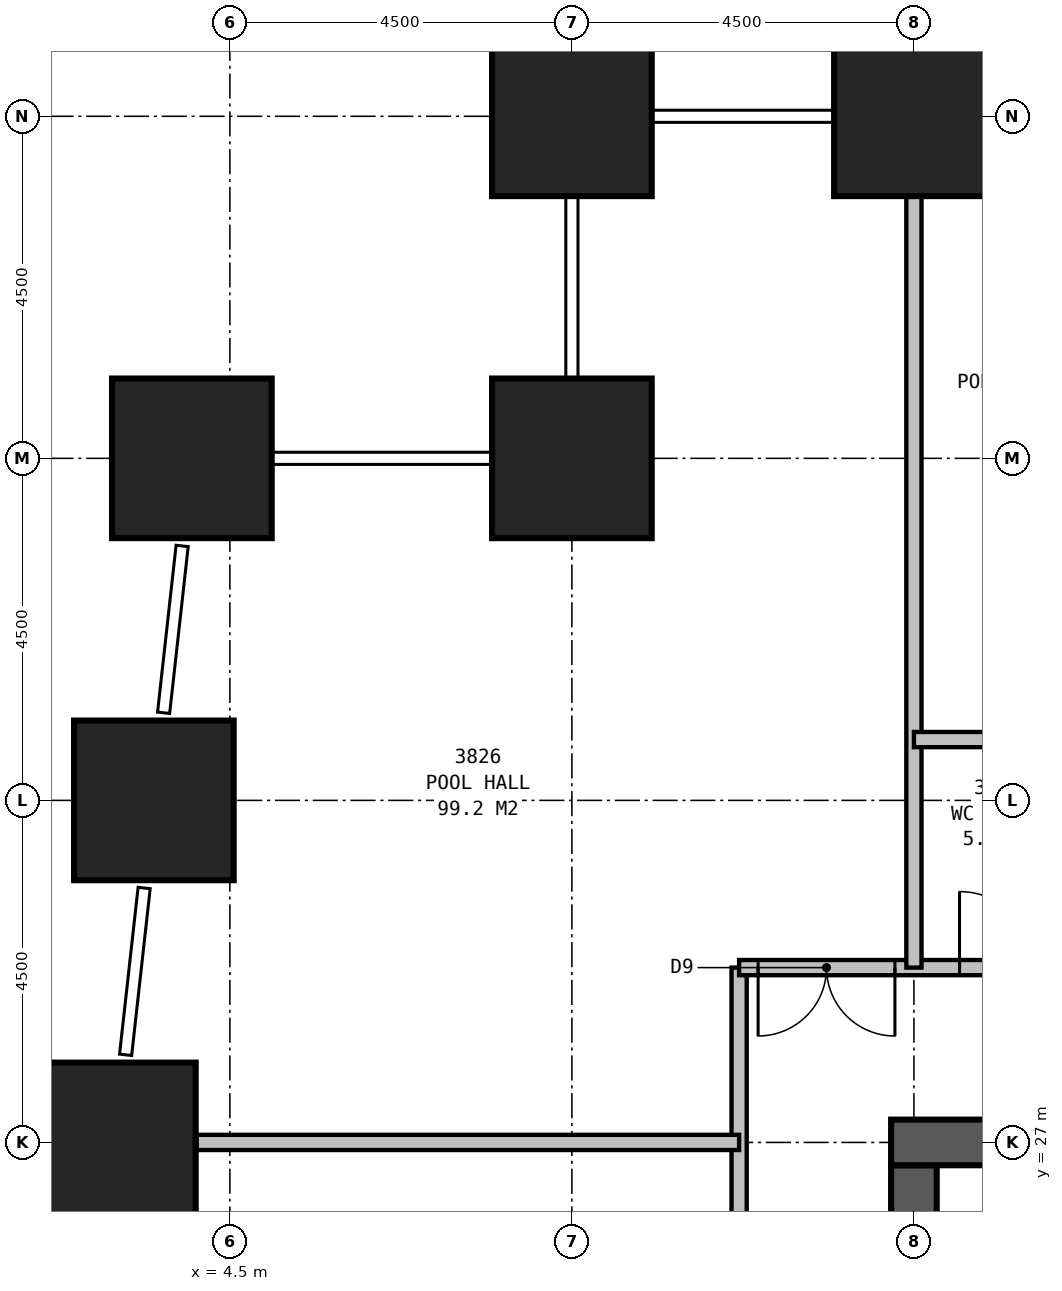
"""IFC4 building model, lengths in metres.
Left out: names, types, materials, properties, quantities, classifications, styles, units other than length and angle.
Written with IfcOpenShell. Run it as: python <this file> out.ifc"""

import sys

from ifc_helpers import new_model, si_unit, direction, frame, frame_2d, origin, origin_2d, place, context, subcontext, project, spatial, rectangle, extrude, element, fill, save


model = new_model("IFC4")
c1 = context("Model", 3, precision=1e-05, world=origin(), true_north=direction((0.0, 1.0)))
c2 = subcontext(c1, "Body", "Model", "MODEL_VIEW")
j1 = project(units=[si_unit("LENGTHUNIT", "METRE"), si_unit("PLANEANGLEUNIT", "RADIAN")], contexts=[c1])
p1 = place(None, origin())
s1 = spatial("IfcSite", under=j1, at=p1, CompositionType="ELEMENT")
p2 = place(p1, origin())
s2 = spatial("IfcBuilding", under=s1, at=p2, CompositionType="ELEMENT")
p3 = place(p2, frame((0.0, 0.0, 145.9)))
s3 = spatial("IfcBuildingStorey", under=s2, at=p3, CompositionType="ELEMENT", Elevation=145.9)
for number, where, z_axis, x_axis in (
    (1, (13.5, 40.5, 0.0), (0.0, 0.0, 1.0), (1.0, 0.0, 0.0)),
    (2, (9.0, 40.5, 0.0), (0.0, 0.0, 1.0), (1.0, 0.0, 0.0)),
    (3, (9.0, 36.0, 0.0), (0.0, 0.0, 1.0), (1.0, 0.0, 0.0)),
    (4, (4.0, 36.0, 0.0), (0.0, 0.0, 1.0), (1.0, 0.0, 0.0)),
    (5, (3.5, 31.5, 0.0), (0.0, 0.0, 1.0), (1.0, 0.0, 0.0)),
    (6, (3.0, 27.0, 0.0), (0.0, 0.0, 1.0), (1.0, 0.0, 0.0)),
):
    element("IfcColumn", number, at=place(p3, frame(where, z_axis=z_axis, x_axis=x_axis)), inside=s3, PredefinedType="COLUMN", context=c2, shape_type="SweptSolid", body=[
        extrude(rectangle(XDim=2.1, YDim=2.1, at=origin_2d()), origin(), (0.0, 0.0, 1.0), 6.0),
    ])
p4 = place(p3, frame((36.3, 27.0, 0.0), z_axis=(0.0, 0.0, 1.0), x_axis=(-1.0, 0.0, 0.0)))
e7 = element("IfcWall", 7, at=p4, inside=s3, PredefinedType="SHEAR", context=c2, shape_type="SweptSolid", body=[
    extrude(rectangle(XDim=23.1, YDim=0.6, at=frame_2d((11.55, 0.0))), origin(), (0.0, 0.0, 1.0), 6.0),
])
p5 = place(p4, frame((17.05, 0.0, 0.0)))
e8 = element("IfcOpeningElement", 8, at=p5, cuts=e7, PredefinedType="OPENING", context=c2, shape_type="SweptSolid", body=[
    extrude(rectangle(XDim=1.0, YDim=2.1, at=frame_2d((0.5, 1.05))), frame((0.0, 0.31, 0.0), z_axis=(0.0, -1.0, 0.0), x_axis=(1.0, 0.0, 0.0)), (0.0, 0.0, 1.0), 0.62),
])
p6 = place(p4, frame((12.05, 0.0, 0.0)))
e9 = element("IfcOpeningElement", 9, at=p6, cuts=e7, PredefinedType="OPENING", context=c2, shape_type="SweptSolid", body=[
    extrude(rectangle(XDim=1.0, YDim=2.1, at=frame_2d((0.5, 1.05))), frame((0.0, 0.31, 0.0), z_axis=(0.0, -1.0, 0.0), x_axis=(1.0, 0.0, 0.0)), (0.0, 0.0, 1.0), 0.62),
])
p7 = place(p4, frame((7.05, 0.0, 0.0)))
e10 = element("IfcOpeningElement", 10, at=p7, cuts=e7, PredefinedType="OPENING", context=c2, shape_type="SweptSolid", body=[
    extrude(rectangle(XDim=1.0, YDim=2.1, at=frame_2d((0.5, 1.05))), frame((0.0, 0.31, 0.0), z_axis=(0.0, -1.0, 0.0), x_axis=(1.0, 0.0, 0.0)), (0.0, 0.0, 1.0), 0.62),
])
p8 = place(p3, frame((13.5, 26.7, 0.0), z_axis=(0.0, 0.0, 1.0), x_axis=(0.0, -1.0, 0.0)))
e11 = element("IfcWall", 11, at=p8, inside=s3, PredefinedType="SHEAR", context=c2, shape_type="SweptSolid", body=[
    extrude(rectangle(XDim=6.7, YDim=0.6, at=frame_2d((3.35, 0.0))), origin(), (0.0, 0.0, 1.0), 6.0),
])
p9 = place(p3, frame((11.2, 29.3, 0.0), z_axis=(0.0, 0.0, 1.0), x_axis=(1.0, 0.0, 0.0)))
e12 = element("IfcWall", 12, at=p9, inside=s3, PredefinedType="PARTITIONING", context=c2, shape_type="SweptSolid", body=[
    extrude(rectangle(XDim=27.1, YDim=0.2, at=frame_2d((13.55, 0.0))), origin(), (0.0, 0.0, 1.0), 5.7),
])
p10 = place(p9, frame((2.9, 0.0, 0.0)))
e13 = element("IfcOpeningElement", 13, at=p10, cuts=e12, PredefinedType="OPENING", context=c2, shape_type="SweptSolid", body=[
    extrude(rectangle(XDim=1.0, YDim=2.1, at=frame_2d((0.5, 1.05))), frame((0.0, 0.11, 0.0), z_axis=(0.0, -1.0, 0.0), x_axis=(1.0, 0.0, 0.0)), (0.0, 0.0, 1.0), 0.22),
])
p11 = place(p9, frame((5.15, 0.0, 0.0)))
e14 = element("IfcOpeningElement", 14, at=p11, cuts=e12, PredefinedType="OPENING", context=c2, shape_type="SweptSolid", body=[
    extrude(rectangle(XDim=1.0, YDim=2.1, at=frame_2d((0.5, 1.05))), frame((0.0, 0.11, 0.0), z_axis=(0.0, -1.0, 0.0), x_axis=(1.0, 0.0, 0.0)), (0.0, 0.0, 1.0), 0.22),
])
p12 = place(p9, frame((7.5, 0.0, 0.0)))
e15 = element("IfcOpeningElement", 15, at=p12, cuts=e12, PredefinedType="OPENING", context=c2, shape_type="SweptSolid", body=[
    extrude(rectangle(XDim=1.0, YDim=2.1, at=frame_2d((0.5, 1.05))), frame((0.0, 0.11, 0.0), z_axis=(0.0, -1.0, 0.0), x_axis=(1.0, 0.0, 0.0)), (0.0, 0.0, 1.0), 0.22),
])
p13 = place(p9, frame((9.6, 0.0, 0.0)))
e16 = element("IfcOpeningElement", 16, at=p13, cuts=e12, PredefinedType="OPENING", context=c2, shape_type="SweptSolid", body=[
    extrude(rectangle(XDim=1.0, YDim=2.1, at=frame_2d((0.5, 1.05))), frame((0.0, 0.11, 0.0), z_axis=(0.0, -1.0, 0.0), x_axis=(1.0, 0.0, 0.0)), (0.0, 0.0, 1.0), 0.22),
])
p14 = place(p9, frame((11.75, 0.0, 0.0)))
e17 = element("IfcOpeningElement", 17, at=p14, cuts=e12, PredefinedType="OPENING", context=c2, shape_type="SweptSolid", body=[
    extrude(rectangle(XDim=1.8, YDim=2.4, at=frame_2d((0.9, 1.2))), frame((0.0, 0.11, 0.0), z_axis=(0.0, -1.0, 0.0), x_axis=(1.0, 0.0, 0.0)), (0.0, 0.0, 1.0), 0.22),
])
p15 = place(p9, frame((2.05, 0.0, 0.0), z_axis=(0.0, 0.0, 1.0), x_axis=(-1.0, 0.0, 0.0)))
e18 = element("IfcOpeningElement", 18, at=p15, cuts=e12, PredefinedType="OPENING", context=c2, shape_type="SweptSolid", body=[
    extrude(rectangle(XDim=1.8, YDim=2.4, at=frame_2d((0.9, 1.2))), frame((0.0, 0.11, 0.0), z_axis=(0.0, -1.0, 0.0), x_axis=(1.0, 0.0, 0.0)), (0.0, 0.0, 1.0), 0.22),
])
p16 = place(p9, frame((25.45, 0.0, 0.0)))
e19 = element("IfcOpeningElement", 19, at=p16, cuts=e12, PredefinedType="OPENING", context=c2, shape_type="SweptSolid", body=[
    extrude(rectangle(XDim=1.0, YDim=2.1, at=frame_2d((0.5, 1.05))), frame((0.0, 0.11, 0.0), z_axis=(0.0, -1.0, 0.0), x_axis=(1.0, 0.0, 0.0)), (0.0, 0.0, 1.0), 0.22),
])
p17 = place(p3, frame((11.2, 11.2, 0.0), z_axis=(0.0, 0.0, 1.0), x_axis=(0.0, 1.0, 0.0)))
e20 = element("IfcWall", 20, at=p17, inside=s3, PredefinedType="PARTITIONING", context=c2, shape_type="SweptSolid", body=[
    extrude(rectangle(XDim=18.1, YDim=0.2, at=frame_2d((9.05, 0.0))), origin(), (0.0, 0.0, 1.0), 5.7),
])
p18 = place(p17, frame((2.75, 0.0, 0.0)))
e21 = element("IfcOpeningElement", 21, at=p18, cuts=e20, PredefinedType="OPENING", context=c2, shape_type="SweptSolid", body=[
    extrude(rectangle(XDim=1.8, YDim=2.4, at=frame_2d((0.9, 1.2))), frame((0.0, 0.11, 0.0), z_axis=(0.0, -1.0, 0.0), x_axis=(1.0, 0.0, 0.0)), (0.0, 0.0, 1.0), 0.22),
])
p19 = place(p3, frame((13.5, 29.3, 0.0), z_axis=(0.0, 0.0, 1.0), x_axis=(0.0, 1.0, 0.0)))
e22 = element("IfcWall", 22, at=p19, inside=s3, PredefinedType="PARTITIONING", context=c2, shape_type="SweptSolid", body=[
    extrude(rectangle(XDim=10.15, YDim=0.2, at=frame_2d((5.075, 0.0))), origin(), (0.0, 0.0, 1.0), 4.7),
])
p20 = place(p3, frame((11.2, 27.0, 0.0), z_axis=(0.0, 0.0, 1.0), x_axis=(-1.0, 0.0, 0.0)))
e23 = element("IfcWall", 23, at=p20, inside=s3, PredefinedType="PARTITIONING", context=c2, shape_type="SweptSolid", body=[
    extrude(rectangle(XDim=7.139, YDim=0.2, at=frame_2d((3.57, 0.0))), origin(), (0.0, 0.0, 1.0), 4.4),
])
p21 = place(p3, frame((13.5, 32.3, 0.0), z_axis=(0.0, 0.0, 1.0), x_axis=(1.0, 0.0, 0.0)))
e24 = element("IfcWall", 24, at=p21, inside=s3, PredefinedType="PARTITIONING", context=c2, shape_type="SweptSolid", body=[
    extrude(rectangle(XDim=4.5, YDim=0.2, at=frame_2d((2.25, 0.0))), origin(), (0.0, 0.0, 1.0), 5.7),
])
p22 = place(p10, origin())
e25 = element("IfcDoor", 25, at=p22, inside=s3, OperationType="SINGLE_SWING_LEFT", PredefinedType="DOOR", context=c2, shape_type="SweptSolid", body=[
    extrude(rectangle(XDim=1.0, YDim=2.1, at=frame_2d((0.5, 1.05))), frame((0.0, 0.025, 0.0), z_axis=(0.0, -1.0, 0.0), x_axis=(1.0, 0.0, 0.0)), (0.0, 0.0, 1.0), 0.05),
])
fill(e13, e25)
p23 = place(p15, origin())
e26 = element("IfcDoor", 26, at=p23, inside=s3, OperationType="DOUBLE_DOOR_SINGLE_SWING", PredefinedType="DOOR", context=c2, shape_type="SweptSolid", body=[
    extrude(rectangle(XDim=1.8, YDim=2.4, at=frame_2d((0.9, 1.2))), frame((0.0, 0.025, 0.0), z_axis=(0.0, -1.0, 0.0), x_axis=(1.0, 0.0, 0.0)), (0.0, 0.0, 1.0), 0.05),
])
fill(e18, e26)
save(model, sys.argv[1])
